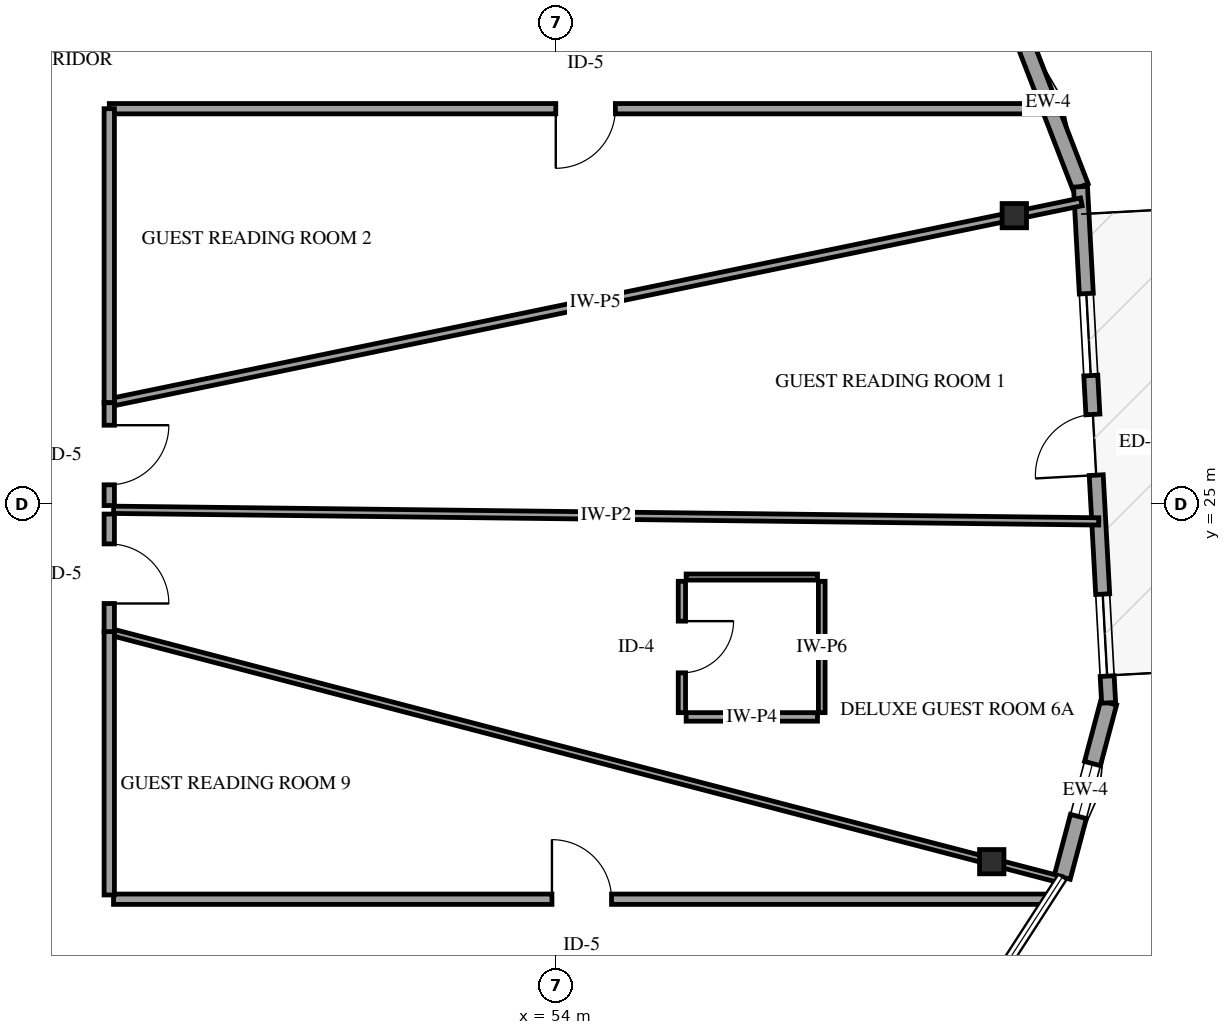
"""IFC4 building model, lengths in metres.
Left out: names, types, materials, properties, quantities, classifications, styles, units other than length and angle.
Written with IfcOpenShell. Run it as: python <this file> out.ifc"""

import sys

from ifc_helpers import new_model, si_unit, direction, frame, frame_2d, origin, origin_2d, place, context, subcontext, project, spatial, rectangle, i_section, extrude, element, fill, save


model = new_model("IFC4")
c1 = context("Model", 3, precision=1e-05, world=origin(), true_north=direction((0.0, 1.0)))
c2 = subcontext(c1, "Body", "Model", "MODEL_VIEW")
j1 = project(units=[si_unit("LENGTHUNIT", "METRE"), si_unit("PLANEANGLEUNIT", "RADIAN")], contexts=[c1])
p1 = place(None, origin())
s1 = spatial("IfcSite", under=j1, at=p1, CompositionType="ELEMENT")
p2 = place(p1, origin())
s2 = spatial("IfcBuilding", under=s1, at=p2, CompositionType="ELEMENT")
p3 = place(p2, frame((0.0, 0.0, 242.5)))
s3 = spatial("IfcBuildingStorey", under=s2, at=p3, CompositionType="ELEMENT", Elevation=242.5)
for number, where, z_axis, x_axis in (
    (1, (61.534, 29.741, -0.3), (0.0, 0.0, 1.0), (1.0, 0.0, 0.0)),
    (2, (61.163, 19.117, -0.3), (0.0, 0.0, 1.0), (1.0, 0.0, 0.0)),
):
    element("IfcColumn", number, at=place(p3, frame(where, z_axis=z_axis, x_axis=x_axis)), inside=s3, PredefinedType="COLUMN", context=c2, shape_type="SweptSolid", body=[
        extrude(i_section(OverallWidth=0.401, OverallDepth=0.399, WebThickness=0.025, FlangeThickness=0.04, FilletRadius=0.038, at=origin_2d()), origin(), (0.0, 0.0, 1.0), 4.05),
    ])
p4 = place(p3, frame((62.323, 18.863, 0.0), z_axis=(0.0, 0.0, 1.0), x_axis=(0.256781470725, 0.966469490616, 0.0)))
e3 = element("IfcWall", 3, at=p4, inside=s3, PredefinedType="SOLIDWALL", context=c2, shape_type="SweptSolid", body=[
    extrude(rectangle(XDim=2.966, YDim=0.27, at=frame_2d((1.483, 0.0))), origin(), (0.0, 0.0, 1.0), 2.829),
])
p5 = place(p4, frame((1.033, 0.0, 0.75)))
e4 = element("IfcOpeningElement", 4, at=p5, cuts=e3, PredefinedType="OPENING", context=c2, shape_type="SweptSolid", body=[
    extrude(rectangle(XDim=0.9, YDim=1.5, at=frame_2d((0.45, 0.75))), frame((0.0, 0.145, 0.0), z_axis=(0.0, -1.0, 0.0), x_axis=(1.0, 0.0, 0.0)), (0.0, 0.0, 1.0), 0.29),
])
p6 = place(p3, frame((62.622, 30.217, 0.0), z_axis=(0.0, 0.0, 1.0), x_axis=(-0.3603683584, 0.93281008049, 0.0)))
e5 = element("IfcWall", 5, at=p6, inside=s3, PredefinedType="SOLIDWALL", context=c2, shape_type="SweptSolid", body=[
    extrude(rectangle(XDim=2.967, YDim=0.27, at=frame_2d((1.483, 0.0))), origin(), (0.0, 0.0, 1.0), 2.829),
])
p7 = place(p3, frame((63.085, 21.729, 0.0), z_axis=(0.0, 0.0, 1.0), x_axis=(-0.05442960739, 0.99851761018, 0.0)))
e6 = element("IfcWall", 6, at=p7, inside=s3, PredefinedType="SOLIDWALL", context=c2, shape_type="SweptSolid", body=[
    extrude(rectangle(XDim=8.5, YDim=0.23, at=frame_2d((4.25, 0.0))), origin(), (0.0, 0.0, 1.0), 2.829),
])
p8 = place(p7, frame((3.75, 0.0, 0.0)))
e7 = element("IfcOpeningElement", 7, at=p8, cuts=e6, PredefinedType="OPENING", context=c2, shape_type="SweptSolid", body=[
    extrude(rectangle(XDim=1.0, YDim=2.15, at=frame_2d((0.5, 1.075))), frame((0.0, 0.125, 0.0), z_axis=(0.0, -1.0, 0.0), x_axis=(1.0, 0.0, 0.0)), (0.0, 0.0, 1.0), 0.25),
])
p9 = place(p7, frame((0.44, 0.0, 0.72)))
e8 = element("IfcOpeningElement", 8, at=p9, cuts=e6, PredefinedType="OPENING", context=c2, shape_type="SweptSolid", body=[
    extrude(rectangle(XDim=1.35, YDim=1.65, at=frame_2d((0.675, 0.825))), frame((0.0, 0.125, 0.0), z_axis=(0.0, -1.0, 0.0), x_axis=(1.0, 0.0, 0.0)), (0.0, 0.0, 1.0), 0.25),
])
p10 = place(p7, frame((5.39, 0.0, 0.72)))
e9 = element("IfcOpeningElement", 9, at=p10, cuts=e6, PredefinedType="OPENING", context=c2, shape_type="SweptSolid", body=[
    extrude(rectangle(XDim=1.35, YDim=1.65, at=frame_2d((0.675, 0.825))), frame((0.0, 0.125, 0.0), z_axis=(0.0, -1.0, 0.0), x_axis=(1.0, 0.0, 0.0)), (0.0, 0.0, 1.0), 0.25),
])
p11 = place(p3, frame((46.65, 26.665, 0.0), z_axis=(0.0, 0.0, 1.0), x_axis=(0.979314922028, 0.202341996367, 0.0)))
e10 = element("IfcWall", 10, at=p11, inside=s3, PredefinedType="PARTITIONING", context=c2, shape_type="SweptSolid", body=[
    extrude(rectangle(XDim=16.324, YDim=0.13, at=frame_2d((8.162, 0.0))), origin(), (0.0, 0.0, 1.0), 2.745),
])
p12 = place(p3, frame((62.922, 24.713, 0.0), z_axis=(0.0, 0.0, 1.0), x_axis=(-0.999930395803, 0.011798455394, 0.0)))
e11 = element("IfcWall", 11, at=p12, inside=s3, PredefinedType="PARTITIONING", context=c2, shape_type="SweptSolid", body=[
    extrude(rectangle(XDim=16.202, YDim=0.12, at=frame_2d((8.101, 0.0))), origin(), (0.0, 0.0, 1.0), 3.45),
])
p13 = place(p3, frame((46.65, 22.901, 0.0), z_axis=(0.0, 0.0, 1.0), x_axis=(0.967662952178, -0.252246726405, 0.0)))
e12 = element("IfcWall", 12, at=p13, inside=s3, PredefinedType="PARTITIONING", context=c2, shape_type="SweptSolid", body=[
    extrude(rectangle(XDim=16.17, YDim=0.11, at=frame_2d((8.085, 0.0))), origin(), (0.0, 0.0, 1.0), 3.45),
])
p14 = place(p3, frame((62.346, 31.5, 0.0), z_axis=(0.0, 0.0, 1.0), x_axis=(-1.0, 0.0, 0.0)))
e13 = element("IfcWall", 13, at=p14, inside=s3, PredefinedType="PARTITIONING", context=c2, shape_type="SweptSolid", body=[
    extrude(rectangle(XDim=15.696, YDim=0.17, at=frame_2d((7.848, 0.0))), origin(), (0.0, 0.0, 1.0), 3.45),
])
p15 = place(p14, frame((7.373, 0.0, 0.0)))
e14 = element("IfcOpeningElement", 14, at=p15, cuts=e13, PredefinedType="OPENING", context=c2, shape_type="SweptSolid", body=[
    extrude(rectangle(XDim=0.98, YDim=2.15, at=frame_2d((0.49, 1.075))), frame((0.0, 0.095, 0.0), z_axis=(0.0, -1.0, 0.0), x_axis=(1.0, 0.0, 0.0)), (0.0, 0.0, 1.0), 0.19),
])
p16 = place(p3, frame((46.72, 18.5, 0.0), z_axis=(0.0, 0.0, 1.0), x_axis=(1.0, 0.0, 0.0)))
e15 = element("IfcWall", 15, at=p16, inside=s3, PredefinedType="PARTITIONING", context=c2, shape_type="SweptSolid", body=[
    extrude(rectangle(XDim=15.369, YDim=0.17, at=frame_2d((7.685, 0.0))), origin(), (0.0, 0.0, 1.0), 2.745),
])
p17 = place(p16, frame((7.21, 0.0, 0.0)))
e16 = element("IfcOpeningElement", 16, at=p17, cuts=e15, PredefinedType="OPENING", context=c2, shape_type="SweptSolid", body=[
    extrude(rectangle(XDim=0.98, YDim=2.15, at=frame_2d((0.49, 1.075))), frame((0.0, 0.095, 0.0), z_axis=(0.0, -1.0, 0.0), x_axis=(1.0, 0.0, 0.0)), (0.0, 0.0, 1.0), 0.19),
])
p18 = place(p3, frame((46.65, 31.5, 0.0), z_axis=(0.0, 0.0, 1.0), x_axis=(0.0, -1.0, 0.0)))
e17 = element("IfcWall", 17, at=p18, inside=s3, PredefinedType="PARTITIONING", context=c2, shape_type="SweptSolid", body=[
    extrude(rectangle(XDim=4.835, YDim=0.17, at=frame_2d((2.417, 0.0))), origin(), (0.0, 0.0, 1.0), 3.45),
])
p19 = place(p3, frame((46.65, 22.901, 0.0), z_axis=(0.0, 0.0, 1.0), x_axis=(0.0, -1.0, 0.0)))
e18 = element("IfcWall", 18, at=p19, inside=s3, PredefinedType="PARTITIONING", context=c2, shape_type="SweptSolid", body=[
    extrude(rectangle(XDim=4.331, YDim=0.17, at=frame_2d((2.166, 0.0))), origin(), (0.0, 0.0, 1.0), 3.45),
])
p20 = place(p3, frame((56.067, 23.728, 0.0), z_axis=(0.0, 0.0, 1.0), x_axis=(0.0, -1.0, 0.0)))
e19 = element("IfcWall", 19, at=p20, inside=s3, PredefinedType="PARTITIONING", context=c2, shape_type="SweptSolid", body=[
    extrude(rectangle(XDim=2.16, YDim=0.12, at=frame_2d((1.08, 0.0))), origin(), (0.0, 0.0, 1.0), 3.45),
])
p21 = place(p20, frame((0.655, 0.0, 0.0)))
e20 = element("IfcOpeningElement", 20, at=p21, cuts=e19, PredefinedType="OPENING", context=c2, shape_type="SweptSolid", body=[
    extrude(rectangle(XDim=0.85, YDim=2.1, at=frame_2d((0.425, 1.05))), frame((0.0, 0.07, 0.0), z_axis=(0.0, -1.0, 0.0), x_axis=(1.0, 0.0, 0.0)), (0.0, 0.0, 1.0), 0.14),
])
p22 = place(p3, frame((58.367, 21.568, 0.0), z_axis=(0.0, 0.0, 1.0), x_axis=(0.0, 1.0, 0.0)))
e21 = element("IfcWall", 21, at=p22, inside=s3, PredefinedType="PARTITIONING", context=c2, shape_type="SweptSolid", body=[
    extrude(rectangle(XDim=2.16, YDim=0.11, at=frame_2d((1.08, 0.0))), origin(), (0.0, 0.0, 1.0), 3.45),
])
p23 = place(p3, frame((58.297, 23.798, 0.0), z_axis=(0.0, 0.0, 1.0), x_axis=(-1.0, 0.0, 0.0)))
e22 = element("IfcWall", 22, at=p23, inside=s3, PredefinedType="PARTITIONING", context=c2, shape_type="SweptSolid", body=[
    extrude(rectangle(XDim=2.16, YDim=0.1, at=frame_2d((1.08, 0.0))), origin(), (0.0, 0.0, 1.0), 3.45),
])
p24 = place(p3, frame((56.137, 21.498, 0.0), z_axis=(0.0, 0.0, 1.0), x_axis=(1.0, 0.0, 0.0)))
e23 = element("IfcWall", 23, at=p24, inside=s3, PredefinedType="PARTITIONING", context=c2, shape_type="SweptSolid", body=[
    extrude(rectangle(XDim=2.16, YDim=0.14, at=frame_2d((1.08, 0.0))), origin(), (0.0, 0.0, 1.0), 3.45),
])
p25 = place(p3, frame((46.65, 24.834, 0.0), z_axis=(0.0, 0.0, 1.0), x_axis=(0.0, -1.0, 0.0)))
e24 = element("IfcWall", 24, at=p25, inside=s3, PredefinedType="PARTITIONING", context=c2, shape_type="SweptSolid", body=[
    extrude(rectangle(XDim=1.933, YDim=0.17, at=frame_2d((0.967, 0.0))), origin(), (0.0, 0.0, 1.0), 3.45),
])
p26 = place(p25, frame((0.491, 0.0, 0.0)))
e25 = element("IfcOpeningElement", 25, at=p26, cuts=e24, PredefinedType="OPENING", context=c2, shape_type="SweptSolid", body=[
    extrude(rectangle(XDim=0.98, YDim=2.15, at=frame_2d((0.49, 1.075))), frame((0.0, 0.095, 0.0), z_axis=(0.0, -1.0, 0.0), x_axis=(1.0, 0.0, 0.0)), (0.0, 0.0, 1.0), 0.19),
])
p27 = place(p3, frame((46.65, 26.665, 0.0), z_axis=(0.0, 0.0, 1.0), x_axis=(0.0, -1.0, 0.0)))
e26 = element("IfcWall", 26, at=p27, inside=s3, PredefinedType="PARTITIONING", context=c2, shape_type="SweptSolid", body=[
    extrude(rectangle(XDim=1.691, YDim=0.17, at=frame_2d((0.845, 0.0))), origin(), (0.0, 0.0, 1.0), 3.45),
])
p28 = place(p27, frame((0.37, 0.0, 0.0)))
e27 = element("IfcOpeningElement", 27, at=p28, cuts=e26, PredefinedType="OPENING", context=c2, shape_type="SweptSolid", body=[
    extrude(rectangle(XDim=0.98, YDim=2.15, at=frame_2d((0.49, 1.075))), frame((0.0, 0.095, 0.0), z_axis=(0.0, -1.0, 0.0), x_axis=(1.0, 0.0, 0.0)), (0.0, 0.0, 1.0), 0.19),
])
p29 = place(p5, origin())
e28 = element("IfcWindow", 28, at=p29, inside=s3, PartitioningType="SINGLE_PANEL", PredefinedType="WINDOW", context=c2, shape_type="SweptSolid", body=[
    extrude(rectangle(XDim=0.9, YDim=1.5, at=frame_2d((0.45, 0.75))), frame((0.0, 0.03, 0.0), z_axis=(0.0, -1.0, 0.0), x_axis=(1.0, 0.0, 0.0)), (0.0, 0.0, 1.0), 0.06),
])
fill(e4, e28)
p30 = place(p8, origin())
e29 = element("IfcDoor", 29, at=p30, inside=s3, OperationType="SINGLE_SWING_LEFT", PredefinedType="DOOR", context=c2, shape_type="SweptSolid", body=[
    extrude(rectangle(XDim=1.0, YDim=2.15, at=frame_2d((0.5, 1.075))), frame((0.0, 0.025, 0.0), z_axis=(0.0, -1.0, 0.0), x_axis=(1.0, 0.0, 0.0)), (0.0, 0.0, 1.0), 0.05),
])
fill(e7, e29)
p31 = place(p9, origin())
e30 = element("IfcWindow", 30, at=p31, inside=s3, PartitioningType="SINGLE_PANEL", PredefinedType="WINDOW", context=c2, shape_type="SweptSolid", body=[
    extrude(rectangle(XDim=1.35, YDim=1.65, at=frame_2d((0.675, 0.825))), frame((0.0, 0.03, 0.0), z_axis=(0.0, -1.0, 0.0), x_axis=(1.0, 0.0, 0.0)), (0.0, 0.0, 1.0), 0.06),
])
fill(e8, e30)
p32 = place(p10, origin())
e31 = element("IfcWindow", 31, at=p32, inside=s3, PartitioningType="SINGLE_PANEL", PredefinedType="WINDOW", context=c2, shape_type="SweptSolid", body=[
    extrude(rectangle(XDim=1.35, YDim=1.65, at=frame_2d((0.675, 0.825))), frame((0.0, 0.03, 0.0), z_axis=(0.0, -1.0, 0.0), x_axis=(1.0, 0.0, 0.0)), (0.0, 0.0, 1.0), 0.06),
])
fill(e9, e31)
p33 = place(p15, origin())
e32 = element("IfcDoor", 32, at=p33, inside=s3, OperationType="SINGLE_SWING_RIGHT", PredefinedType="DOOR", context=c2, shape_type="SweptSolid", body=[
    extrude(rectangle(XDim=0.98, YDim=2.15, at=frame_2d((0.49, 1.075))), frame((0.0, 0.025, 0.0), z_axis=(0.0, -1.0, 0.0), x_axis=(1.0, 0.0, 0.0)), (0.0, 0.0, 1.0), 0.05),
])
fill(e14, e32)
p34 = place(p17, origin())
e33 = element("IfcDoor", 33, at=p34, inside=s3, OperationType="SINGLE_SWING_LEFT", PredefinedType="DOOR", context=c2, shape_type="SweptSolid", body=[
    extrude(rectangle(XDim=0.98, YDim=2.15, at=frame_2d((0.49, 1.075))), frame((0.0, 0.025, 0.0), z_axis=(0.0, -1.0, 0.0), x_axis=(1.0, 0.0, 0.0)), (0.0, 0.0, 1.0), 0.05),
])
fill(e16, e33)
p35 = place(p21, origin())
e34 = element("IfcDoor", 34, at=p35, inside=s3, OperationType="SINGLE_SWING_LEFT", PredefinedType="DOOR", context=c2, shape_type="SweptSolid", body=[
    extrude(rectangle(XDim=0.85, YDim=2.1, at=frame_2d((0.425, 1.05))), frame((0.0, 0.025, 0.0), z_axis=(0.0, -1.0, 0.0), x_axis=(1.0, 0.0, 0.0)), (0.0, 0.0, 1.0), 0.05),
])
fill(e20, e34)
p36 = place(p26, origin())
e35 = element("IfcDoor", 35, at=p36, inside=s3, OperationType="SINGLE_SWING_RIGHT", PredefinedType="DOOR", context=c2, shape_type="SweptSolid", body=[
    extrude(rectangle(XDim=0.98, YDim=2.15, at=frame_2d((0.49, 1.075))), frame((0.0, 0.025, 0.0), z_axis=(0.0, -1.0, 0.0), x_axis=(1.0, 0.0, 0.0)), (0.0, 0.0, 1.0), 0.05),
])
fill(e25, e35)
p37 = place(p28, origin())
e36 = element("IfcDoor", 36, at=p37, inside=s3, OperationType="SINGLE_SWING_LEFT", PredefinedType="DOOR", context=c2, shape_type="SweptSolid", body=[
    extrude(rectangle(XDim=0.98, YDim=2.15, at=frame_2d((0.49, 1.075))), frame((0.0, 0.025, 0.0), z_axis=(0.0, -1.0, 0.0), x_axis=(1.0, 0.0, 0.0)), (0.0, 0.0, 1.0), 0.05),
])
fill(e27, e36)
save(model, sys.argv[1])
